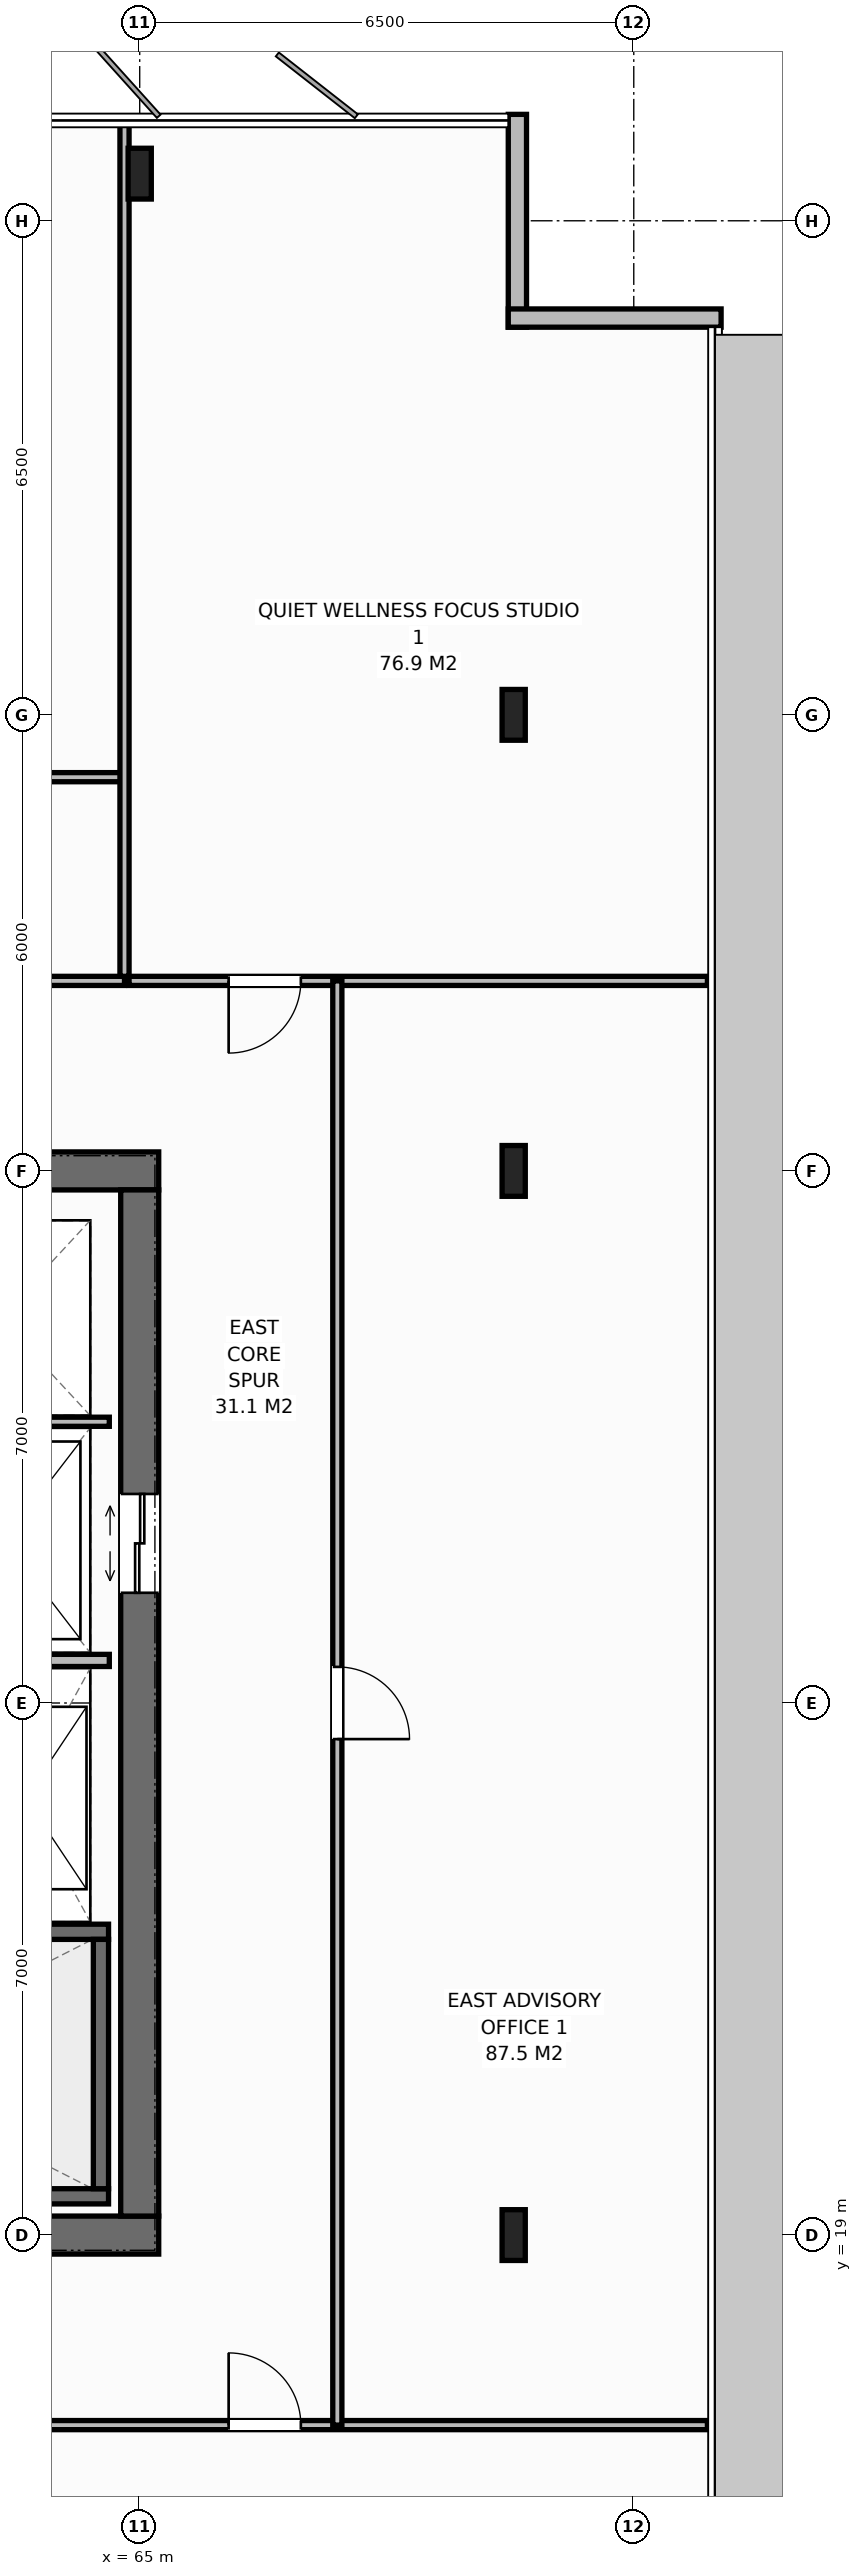
"""IFC4 building model, lengths in metres.
Left out: names, types, materials, properties, quantities, classifications, styles, units other than length and angle.
Written with IfcOpenShell. Run it as: python <this file> out.ifc"""

import sys

from ifc_helpers import new_model, si_unit, direction, frame, frame_2d, origin, origin_2d, place, context, subcontext, project, spatial, rectangle, i_section, extrude, element, fill, save


model = new_model("IFC4")
c1 = context("Model", 3, precision=1e-05, world=origin(), true_north=direction((0.0, 1.0)))
c2 = subcontext(c1, "Body", "Model", "MODEL_VIEW")
j1 = project(units=[si_unit("LENGTHUNIT", "METRE"), si_unit("PLANEANGLEUNIT", "RADIAN")], contexts=[c1])
p1 = place(None, origin())
s1 = spatial("IfcSite", under=j1, at=p1, CompositionType="ELEMENT")
p2 = place(p1, origin())
s2 = spatial("IfcBuilding", under=s1, at=p2, CompositionType="ELEMENT")
p3 = place(p2, frame((0.0, 0.0, 282.4)))
s3 = spatial("IfcBuildingStorey", under=s2, at=p3, CompositionType="ELEMENT", Elevation=282.4)
p4 = place(p3, frame((51.75, 19.0, 0.0), z_axis=(0.0, 0.0, 1.0), x_axis=(1.0, 0.0, 0.0)))
e1 = element("IfcWall", 1, at=p4, inside=s3, PredefinedType="SHEAR", context=c2, shape_type="SweptSolid", body=[
    extrude(rectangle(XDim=13.5, YDim=0.5, at=frame_2d((6.75, 0.0))), origin(), (0.0, 0.0, 1.0), 4.0),
])
p5 = place(p4, frame((2.97, 0.0, 0.0)))
e2 = element("IfcOpeningElement", 2, at=p5, cuts=e1, PredefinedType="OPENING", context=c2, shape_type="SweptSolid", body=[
    extrude(rectangle(XDim=1.4, YDim=2.2, at=frame_2d((0.7, 1.1))), frame((0.0, 0.26, 0.0), z_axis=(0.0, -1.0, 0.0), x_axis=(1.0, 0.0, 0.0)), (0.0, 0.0, 1.0), 0.52),
])
p6 = place(p3, frame((51.75, 33.0, 0.0), z_axis=(0.0, 0.0, 1.0), x_axis=(1.0, 0.0, 0.0)))
e3 = element("IfcWall", 3, at=p6, inside=s3, PredefinedType="SHEAR", context=c2, shape_type="SweptSolid", body=[
    extrude(rectangle(XDim=13.5, YDim=0.5, at=frame_2d((6.75, 0.0))), origin(), (0.0, 0.0, 1.0), 4.0),
])
p7 = place(p6, frame((2.97, 0.0, 0.0)))
e4 = element("IfcOpeningElement", 4, at=p7, cuts=e3, PredefinedType="OPENING", context=c2, shape_type="SweptSolid", body=[
    extrude(rectangle(XDim=1.4, YDim=2.2, at=frame_2d((0.7, 1.1))), frame((0.0, 0.26, 0.0), z_axis=(0.0, -1.0, 0.0), x_axis=(1.0, 0.0, 0.0)), (0.0, 0.0, 1.0), 0.52),
])
p8 = place(p6, frame((10.85, 0.0, 0.0)))
e5 = element("IfcOpeningElement", 5, at=p8, cuts=e3, PredefinedType="OPENING", context=c2, shape_type="SweptSolid", body=[
    extrude(rectangle(XDim=0.9, YDim=2.15, at=frame_2d((0.45, 1.075))), frame((0.0, 0.26, 0.0), z_axis=(0.0, -1.0, 0.0), x_axis=(1.0, 0.0, 0.0)), (0.0, 0.0, 1.0), 0.52),
])
p9 = place(p6, frame((5.6, 0.0, 0.0)))
e6 = element("IfcOpeningElement", 6, at=p9, cuts=e3, PredefinedType="OPENING", context=c2, shape_type="SweptSolid", body=[
    extrude(rectangle(XDim=0.9, YDim=2.15, at=frame_2d((0.45, 1.075))), frame((0.0, 0.26, 0.0), z_axis=(0.0, -1.0, 0.0), x_axis=(1.0, 0.0, 0.0)), (0.0, 0.0, 1.0), 0.52),
])
p10 = place(p6, frame((7.2, 0.0, 0.0)))
e7 = element("IfcOpeningElement", 7, at=p10, cuts=e3, PredefinedType="OPENING", context=c2, shape_type="SweptSolid", body=[
    extrude(rectangle(XDim=0.9, YDim=2.15, at=frame_2d((0.45, 1.075))), frame((0.0, 0.26, 0.0), z_axis=(0.0, -1.0, 0.0), x_axis=(1.0, 0.0, 0.0)), (0.0, 0.0, 1.0), 0.52),
])
p11 = place(p6, frame((8.8, 0.0, 0.0)))
e8 = element("IfcOpeningElement", 8, at=p11, cuts=e3, PredefinedType="OPENING", context=c2, shape_type="SweptSolid", body=[
    extrude(rectangle(XDim=0.9, YDim=2.15, at=frame_2d((0.45, 1.075))), frame((0.0, 0.26, 0.0), z_axis=(0.0, -1.0, 0.0), x_axis=(1.0, 0.0, 0.0)), (0.0, 0.0, 1.0), 0.52),
])
p12 = place(p3, frame((65.0, 19.25, 0.0), z_axis=(0.0, 0.0, 1.0), x_axis=(0.0, 1.0, 0.0)))
e9 = element("IfcWall", 9, at=p12, inside=s3, PredefinedType="SHEAR", context=c2, shape_type="SweptSolid", body=[
    extrude(rectangle(XDim=13.5, YDim=0.5, at=frame_2d((6.75, 0.0))), origin(), (0.0, 0.0, 1.0), 4.0),
])
p13 = place(p12, frame((8.2, 0.0, 0.0)))
e10 = element("IfcOpeningElement", 10, at=p13, cuts=e9, PredefinedType="OPENING", context=c2, shape_type="SweptSolid", body=[
    extrude(rectangle(XDim=1.3, YDim=2.2, at=frame_2d((0.65, 1.1))), frame((0.0, 0.26, 0.0), z_axis=(0.0, -1.0, 0.0), x_axis=(1.0, 0.0, 0.0)), (0.0, 0.0, 1.0), 0.52),
])
p14 = place(p3, frame((56.16, 19.51, 0.0), z_axis=(0.0, 0.0, 1.0), x_axis=(1.0, 0.0, 0.0)))
e11 = element("IfcWall", 11, at=p14, inside=s3, PredefinedType="SHEAR", context=c2, shape_type="SweptSolid", body=[
    extrude(rectangle(XDim=8.43, YDim=0.2, at=frame_2d((4.215, 0.0))), origin(), (0.0, 0.0, 1.0), 4.0),
])
p15 = place(p3, frame((56.16, 22.99, 0.0), z_axis=(0.0, 0.0, 1.0), x_axis=(1.0, 0.0, 0.0)))
e12 = element("IfcWall", 12, at=p15, inside=s3, PredefinedType="SHEAR", context=c2, shape_type="SweptSolid", body=[
    extrude(rectangle(XDim=8.43, YDim=0.2, at=frame_2d((4.215, 0.0))), origin(), (0.0, 0.0, 1.0), 4.0),
])
p16 = place(p15, frame((0.45, 0.0, 0.0)))
e13 = element("IfcOpeningElement", 13, at=p16, cuts=e12, PredefinedType="OPENING", context=c2, shape_type="SweptSolid", body=[
    extrude(rectangle(XDim=1.0, YDim=2.15, at=frame_2d((0.5, 1.075))), frame((0.0, 0.11, 0.0), z_axis=(0.0, -1.0, 0.0), x_axis=(1.0, 0.0, 0.0)), (0.0, 0.0, 1.0), 0.22),
])
p17 = place(p3, frame((64.49, 19.61, 0.0), z_axis=(0.0, 0.0, 1.0), x_axis=(0.0, 1.0, 0.0)))
e14 = element("IfcWall", 14, at=p17, inside=s3, PredefinedType="SHEAR", context=c2, shape_type="SweptSolid", body=[
    extrude(rectangle(XDim=3.28, YDim=0.2, at=frame_2d((1.64, 0.0))), origin(), (0.0, 0.0, 1.0), 4.0),
])
for number, where, z_axis, x_axis in (
    (15, (65.0, 46.12, 0.0), (0.0, 0.0, 1.0), (1.0, 0.0, 0.0)),
    (16, (69.92, 19.0, 0.0), (0.0, 0.0, 1.0), (1.0, 0.0, 0.0)),
    (17, (69.92, 33.0, 0.0), (0.0, 0.0, 1.0), (1.0, 0.0, 0.0)),
    (18, (69.92, 39.0, 0.0), (0.0, 0.0, 1.0), (1.0, 0.0, 0.0)),
):
    element("IfcColumn", number, at=place(p3, frame(where, z_axis=z_axis, x_axis=x_axis)), inside=s3, PredefinedType="COLUMN", context=c2, shape_type="SweptSolid", body=[
        extrude(i_section(OverallWidth=0.305, OverallDepth=0.668, WebThickness=0.021, FlangeThickness=0.04, at=origin_2d()), origin(), (0.0, 0.0, 1.0), 4.0),
    ])
p18 = place(p3, frame((69.969, 46.9, 0.0), z_axis=(0.0, 0.0, 1.0), x_axis=(0.0, -1.0, 0.0)))
e19 = element("IfcWall", 19, at=p18, inside=s3, PredefinedType="STANDARD", context=c2, shape_type="SweptSolid", body=[
    extrude(rectangle(XDim=2.8, YDim=0.24, at=frame_2d((1.4, 0.0))), origin(), (0.0, 0.0, 1.0), 3.788),
])
p19 = place(p3, frame((69.849, 44.22, 0.0), z_axis=(0.0, 0.0, 1.0), x_axis=(1.0, 0.0, 0.0)))
e20 = element("IfcWall", 20, at=p19, inside=s3, PredefinedType="STANDARD", context=c2, shape_type="SweptSolid", body=[
    extrude(rectangle(XDim=2.8, YDim=0.24, at=frame_2d((1.4, 0.0))), origin(), (0.0, 0.0, 1.0), 3.788),
])
p20 = place(p3, frame((56.26, 26.56, 0.0), z_axis=(0.0, 0.0, 1.0), x_axis=(1.0, 0.0, 0.0)))
e21 = element("IfcWall", 21, at=p20, inside=s3, PredefinedType="STANDARD", context=c2, shape_type="SweptSolid", body=[
    extrude(rectangle(XDim=8.34, YDim=0.16, at=frame_2d((4.17, 0.0))), origin(), (0.0, 0.0, 1.0), 3.788),
])
p21 = place(p3, frame((61.87, 29.7, 0.0), z_axis=(0.0, 0.0, 1.0), x_axis=(1.0, 0.0, 0.0)))
e22 = element("IfcWall", 22, at=p21, inside=s3, PredefinedType="PARTITIONING", context=c2, shape_type="SweptSolid", body=[
    extrude(rectangle(XDim=2.73, YDim=0.12, at=frame_2d((1.365, 0.0))), origin(), (0.0, 0.0, 1.0), 3.788),
])
p22 = place(p3, frame((51.64, 35.5, 0.0), z_axis=(0.0, 0.0, 1.0), x_axis=(1.0, 0.0, 0.0)))
e23 = element("IfcWall", 23, at=p22, inside=s3, PredefinedType="PARTITIONING", context=c2, shape_type="SweptSolid", body=[
    extrude(rectangle(XDim=13.16, YDim=0.12, at=frame_2d((6.58, 0.0))), origin(), (0.0, 0.0, 1.0), 3.788),
])
p23 = place(p22, frame((1.51, 0.0, 0.0)))
e24 = element("IfcOpeningElement", 24, at=p23, cuts=e23, PredefinedType="OPENING", context=c2, shape_type="SweptSolid", body=[
    extrude(rectangle(XDim=0.9, YDim=2.15, at=frame_2d((0.45, 1.075))), frame((0.0, 0.07, 0.0), z_axis=(0.0, -1.0, 0.0), x_axis=(1.0, 0.0, 0.0)), (0.0, 0.0, 1.0), 0.14),
])
p24 = place(p22, frame((4.51, 0.0, 0.0)))
e25 = element("IfcOpeningElement", 25, at=p24, cuts=e23, PredefinedType="OPENING", context=c2, shape_type="SweptSolid", body=[
    extrude(rectangle(XDim=0.9, YDim=2.15, at=frame_2d((0.45, 1.075))), frame((0.0, 0.07, 0.0), z_axis=(0.0, -1.0, 0.0), x_axis=(1.0, 0.0, 0.0)), (0.0, 0.0, 1.0), 0.14),
])
p25 = place(p22, frame((8.36, 0.0, 0.0)))
e26 = element("IfcOpeningElement", 26, at=p25, cuts=e23, PredefinedType="OPENING", context=c2, shape_type="SweptSolid", body=[
    extrude(rectangle(XDim=0.9, YDim=2.15, at=frame_2d((0.45, 1.075))), frame((0.0, 0.07, 0.0), z_axis=(0.0, -1.0, 0.0), x_axis=(1.0, 0.0, 0.0)), (0.0, 0.0, 1.0), 0.14),
])
p26 = place(p22, frame((10.96, 0.0, 0.0)))
e27 = element("IfcOpeningElement", 27, at=p26, cuts=e23, PredefinedType="OPENING", context=c2, shape_type="SweptSolid", body=[
    extrude(rectangle(XDim=0.95, YDim=2.15, at=frame_2d((0.475, 1.075))), frame((0.0, 0.07, 0.0), z_axis=(0.0, -1.0, 0.0), x_axis=(1.0, 0.0, 0.0)), (0.0, 0.0, 1.0), 0.14),
])
p27 = place(p3, frame((51.64, 38.18, 0.0), z_axis=(0.0, 0.0, 1.0), x_axis=(1.0, 0.0, 0.0)))
e28 = element("IfcWall", 28, at=p27, inside=s3, PredefinedType="PARTITIONING", context=c2, shape_type="SweptSolid", body=[
    extrude(rectangle(XDim=13.16, YDim=0.12, at=frame_2d((6.58, 0.0))), origin(), (0.0, 0.0, 1.0), 3.788),
])
p28 = place(p3, frame((64.8, 35.56, 0.0), z_axis=(0.0, 0.0, 1.0), x_axis=(0.0, 1.0, 0.0)))
e29 = element("IfcWall", 29, at=p28, inside=s3, PredefinedType="PARTITIONING", context=c2, shape_type="SweptSolid", body=[
    extrude(rectangle(XDim=11.32, YDim=0.12, at=frame_2d((5.66, 0.0))), origin(), (0.0, 0.0, 1.0), 2.988),
])
p29 = place(p3, frame((64.86, 35.5, 0.0), z_axis=(0.0, 0.0, 1.0), x_axis=(1.0, 0.0, 0.0)))
e30 = element("IfcWall", 30, at=p29, inside=s3, PredefinedType="PARTITIONING", context=c2, shape_type="SweptSolid", body=[
    extrude(rectangle(XDim=7.609, YDim=0.12, at=frame_2d((3.804, 0.0))), origin(), (0.0, 0.0, 1.0), 3.788),
])
p30 = place(p29, frame((1.31, 0.0, 0.0)))
e31 = element("IfcOpeningElement", 31, at=p30, cuts=e30, PredefinedType="OPENING", context=c2, shape_type="SweptSolid", body=[
    extrude(rectangle(XDim=0.95, YDim=2.15, at=frame_2d((0.475, 1.075))), frame((0.0, 0.07, 0.0), z_axis=(0.0, -1.0, 0.0), x_axis=(1.0, 0.0, 0.0)), (0.0, 0.0, 1.0), 0.14),
])
p31 = place(p3, frame((63.469, 16.5, 0.0), z_axis=(0.0, 0.0, 1.0), x_axis=(1.0, 0.0, 0.0)))
e32 = element("IfcWall", 32, at=p31, inside=s3, PredefinedType="PARTITIONING", context=c2, shape_type="SweptSolid", body=[
    extrude(rectangle(XDim=9.0, YDim=0.12, at=frame_2d((4.5, 0.0))), origin(), (0.0, 0.0, 1.0), 3.788),
])
p32 = place(p31, frame((2.701, 0.0, 0.0)))
e33 = element("IfcOpeningElement", 33, at=p32, cuts=e32, PredefinedType="OPENING", context=c2, shape_type="SweptSolid", body=[
    extrude(rectangle(XDim=0.95, YDim=2.15, at=frame_2d((0.475, 1.075))), frame((0.0, 0.07, 0.0), z_axis=(0.0, -1.0, 0.0), x_axis=(1.0, 0.0, 0.0)), (0.0, 0.0, 1.0), 0.14),
])
p33 = place(p3, frame((67.6, 16.5, 0.0), z_axis=(0.0, 0.0, 1.0), x_axis=(0.0, 1.0, 0.0)))
e34 = element("IfcWall", 34, at=p33, inside=s3, PredefinedType="PARTITIONING", context=c2, shape_type="SweptSolid", body=[
    extrude(rectangle(XDim=19.0, YDim=0.12, at=frame_2d((9.5, 0.0))), origin(), (0.0, 0.0, 1.0), 3.788),
])
p34 = place(p33, frame((9.025, 0.0, 0.0)))
e35 = element("IfcOpeningElement", 35, at=p34, cuts=e34, PredefinedType="OPENING", context=c2, shape_type="SweptSolid", body=[
    extrude(rectangle(XDim=0.95, YDim=2.15, at=frame_2d((0.475, 1.075))), frame((0.0, 0.07, 0.0), z_axis=(0.0, -1.0, 0.0), x_axis=(1.0, 0.0, 0.0)), (0.0, 0.0, 1.0), 0.14),
])
p35 = place(p13, origin())
e36 = element("IfcDoor", 36, at=p35, inside=s3, OperationType="DOUBLE_DOOR_SLIDING", PredefinedType="DOOR", context=c2, shape_type="SweptSolid", body=[
    extrude(rectangle(XDim=1.3, YDim=2.2, at=frame_2d((0.65, 1.1))), frame((0.0, 0.025, 0.0), z_axis=(0.0, -1.0, 0.0), x_axis=(1.0, 0.0, 0.0)), (0.0, 0.0, 1.0), 0.05),
])
fill(e10, e36)
p36 = place(p30, origin())
e37 = element("IfcDoor", 37, at=p36, inside=s3, OperationType="SINGLE_SWING_RIGHT", PredefinedType="DOOR", context=c2, shape_type="SweptSolid", body=[
    extrude(rectangle(XDim=0.95, YDim=2.15, at=frame_2d((0.475, 1.075))), frame((0.0, 0.025, 0.0), z_axis=(0.0, -1.0, 0.0), x_axis=(1.0, 0.0, 0.0)), (0.0, 0.0, 1.0), 0.05),
])
fill(e31, e37)
p37 = place(p32, origin())
e38 = element("IfcDoor", 38, at=p37, inside=s3, OperationType="SINGLE_SWING_LEFT", PredefinedType="DOOR", context=c2, shape_type="SweptSolid", body=[
    extrude(rectangle(XDim=0.95, YDim=2.15, at=frame_2d((0.475, 1.075))), frame((0.0, 0.025, 0.0), z_axis=(0.0, -1.0, 0.0), x_axis=(1.0, 0.0, 0.0)), (0.0, 0.0, 1.0), 0.05),
])
fill(e33, e38)
p38 = place(p34, origin())
e39 = element("IfcDoor", 39, at=p38, inside=s3, OperationType="SINGLE_SWING_RIGHT", PredefinedType="DOOR", context=c2, shape_type="SweptSolid", body=[
    extrude(rectangle(XDim=0.95, YDim=2.15, at=frame_2d((0.475, 1.075))), frame((0.0, 0.025, 0.0), z_axis=(0.0, -1.0, 0.0), x_axis=(1.0, 0.0, 0.0)), (0.0, 0.0, 1.0), 0.05),
])
fill(e35, e39)
save(model, sys.argv[1])
